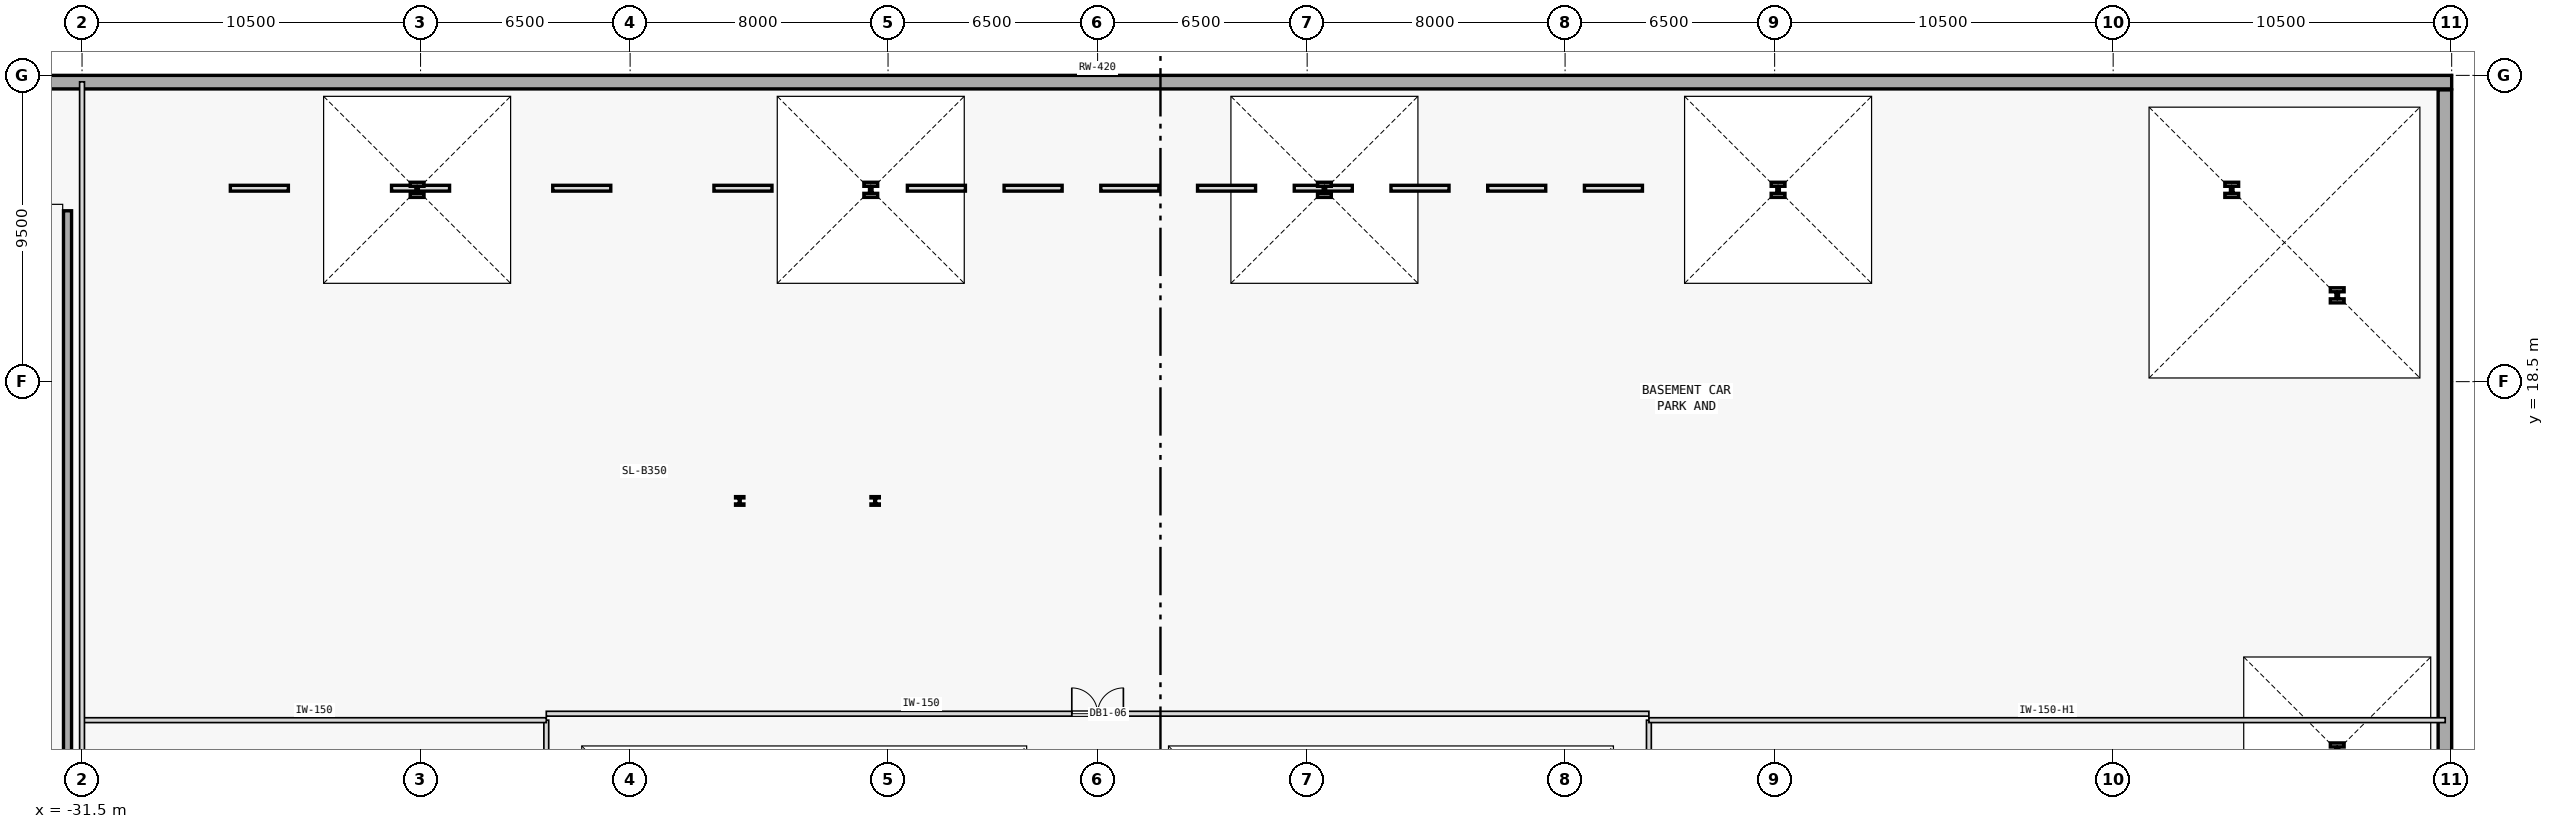
"""IFC4 building model, lengths in metres.
Left out: names, types, materials, properties, quantities, classifications, styles, units other than length and angle.
Written with IfcOpenShell. Run it as: python <this file> out.ifc"""

import sys

from ifc_helpers import new_model, si_unit, direction, frame, frame_2d, origin, origin_2d, place, context, subcontext, project, spatial, rectangle, i_section, extrude, element, fill, save


model = new_model("IFC4")
c1 = context("Model", 3, precision=1e-05, world=origin(), true_north=direction((0.0, 1.0)))
c2 = subcontext(c1, "Body", "Model", "MODEL_VIEW")
j1 = project(units=[si_unit("LENGTHUNIT", "METRE"), si_unit("PLANEANGLEUNIT", "RADIAN")], contexts=[c1])
p1 = place(None, origin())
s1 = spatial("IfcSite", under=j1, at=p1, CompositionType="ELEMENT")
p2 = place(p1, origin())
s2 = spatial("IfcBuilding", under=s1, at=p2, CompositionType="ELEMENT")
p3 = place(p2, frame((0.0, 0.0, -5.0)))
s3 = spatial("IfcBuildingStorey", under=s2, at=p3, CompositionType="ELEMENT", Elevation=-5.0)
p4 = place(p3, frame((-42.0, 27.79, 0.0), z_axis=(0.0, 0.0, 1.0), x_axis=(1.0, 0.0, 0.0)))
e1 = element("IfcWall", 1, at=p4, inside=s3, PredefinedType="SHEAR", context=c2, shape_type="SweptSolid", body=[
    extrude(rectangle(XDim=84.0, YDim=0.42, at=frame_2d((42.0, 0.0))), origin(), (0.0, 0.0, 1.0), 4.7),
])
p5 = place(p3, frame((41.79, -27.55, 0.0), z_axis=(0.0, 0.0, 1.0), x_axis=(0.0, 1.0, 0.0)))
e2 = element("IfcWall", 2, at=p5, inside=s3, PredefinedType="SHEAR", context=c2, shape_type="SweptSolid", body=[
    extrude(rectangle(XDim=55.1, YDim=0.42, at=frame_2d((27.55, 0.0))), origin(), (0.0, 0.0, 1.0), 4.7),
])
p6 = place(p3, frame((-31.95, -16.0, 0.0), z_axis=(0.0, 0.0, 1.0), x_axis=(0.0, 1.0, 0.0)))
e3 = element("IfcWall", 3, at=p6, inside=s3, PredefinedType="SHEAR", context=c2, shape_type="SweptSolid", body=[
    extrude(rectangle(XDim=39.8, YDim=0.25, at=frame_2d((19.9, 0.0))), origin(), (0.0, 0.0, 1.0), 4.7),
])
for number, where, z_axis, x_axis in (
    (4, (38.45, 7.059, 0.0), (0.0, 0.0, 1.0), (1.0, 0.0, 0.0)),
    (5, (38.45, 21.178, 0.0), (0.0, 0.0, 1.0), (1.0, 0.0, 0.0)),
    (6, (35.178, 24.45, 0.0), (0.0, 0.0, 1.0), (1.0, 0.0, 0.0)),
    (7, (21.107, 24.45, 0.0), (0.0, 0.0, 1.0), (1.0, 0.0, 0.0)),
    (8, (7.036, 24.45, 0.0), (0.0, 0.0, 1.0), (1.0, 0.0, 0.0)),
    (9, (-7.036, 24.45, 0.0), (0.0, 0.0, 1.0), (1.0, 0.0, 0.0)),
    (10, (-21.107, 24.45, 0.0), (0.0, 0.0, 1.0), (1.0, 0.0, 0.0)),
):
    element("IfcColumn", number, at=place(p3, frame(where, z_axis=z_axis, x_axis=x_axis)), inside=s3, PredefinedType="USERDEFINED", context=c2, shape_type="SweptSolid", body=[
        extrude(i_section(OverallWidth=0.428, OverallDepth=0.469, WebThickness=0.078, FlangeThickness=0.125, FilletRadius=0.015, at=origin_2d()), origin(), (0.0, 0.0, 1.0), 5.0),
    ])
for number, where, z_axis, x_axis in (
    (11, (-11.1, 14.8, 0.0), (0.0, 0.0, 1.0), (1.0, 0.0, 0.0)),
    (12, (-6.9, 14.8, 0.0), (0.0, 0.0, 1.0), (1.0, 0.0, 0.0)),
):
    element("IfcColumn", number, at=place(p3, frame(where, z_axis=z_axis, x_axis=x_axis)), inside=s3, PredefinedType="COLUMN", context=c2, shape_type="SweptSolid", body=[
        extrude(i_section(OverallWidth=0.259, OverallDepth=0.267, WebThickness=0.013, FlangeThickness=0.021, FilletRadius=0.013, at=origin_2d()), origin(), (0.0, 0.0, 1.0), 5.0),
    ])
p7 = place(p3, frame((-17.1, 8.2, 0.0), z_axis=(0.0, 0.0, 1.0), x_axis=(1.0, 0.0, 0.0)))
e13 = element("IfcWall", 13, at=p7, inside=s3, PredefinedType="PARTITIONING", context=c2, shape_type="SweptSolid", body=[
    extrude(rectangle(XDim=34.2, YDim=0.15, at=frame_2d((17.1, 0.0))), origin(), (0.0, 0.0, 1.0), 4.7),
])
p8 = place(p7, frame((16.3, 0.0, 0.0)))
e14 = element("IfcOpeningElement", 14, at=p8, cuts=e13, PredefinedType="OPENING", context=c2, shape_type="SweptSolid", body=[
    extrude(rectangle(XDim=1.6, YDim=2.15, at=frame_2d((0.8, 1.075))), frame((0.0, 0.085, 0.0), z_axis=(0.0, -1.0, 0.0), x_axis=(1.0, 0.0, 0.0)), (0.0, 0.0, 1.0), 0.17),
])
p9 = place(p3, frame((17.1, 0.0, 0.0), z_axis=(0.0, 0.0, 1.0), x_axis=(0.0, 1.0, 0.0)))
e15 = element("IfcWall", 15, at=p9, inside=s3, PredefinedType="PARTITIONING", context=c2, shape_type="SweptSolid", body=[
    extrude(rectangle(XDim=8.0, YDim=0.15, at=frame_2d((4.0, 0.0))), origin(), (0.0, 0.0, 1.0), 4.7),
])
p10 = place(p9, frame((2.225, 0.0, 0.0)))
e16 = element("IfcOpeningElement", 16, at=p10, cuts=e15, PredefinedType="OPENING", context=c2, shape_type="SweptSolid", body=[
    extrude(rectangle(XDim=1.15, YDim=2.15, at=frame_2d((0.575, 1.075))), frame((0.0, 0.085, 0.0), z_axis=(0.0, -1.0, 0.0), x_axis=(1.0, 0.0, 0.0)), (0.0, 0.0, 1.0), 0.17),
])
p11 = place(p3, frame((-17.1, 0.0, 0.0), z_axis=(0.0, 0.0, 1.0), x_axis=(0.0, 1.0, 0.0)))
e17 = element("IfcWall", 17, at=p11, inside=s3, PredefinedType="PARTITIONING", context=c2, shape_type="SweptSolid", body=[
    extrude(rectangle(XDim=8.0, YDim=0.15, at=frame_2d((4.0, 0.0))), origin(), (0.0, 0.0, 1.0), 4.7),
])
p12 = place(p11, frame((2.225, 0.0, 0.0)))
e18 = element("IfcOpeningElement", 18, at=p12, cuts=e17, PredefinedType="OPENING", context=c2, shape_type="SweptSolid", body=[
    extrude(rectangle(XDim=1.15, YDim=2.15, at=frame_2d((0.575, 1.075))), frame((0.0, 0.085, 0.0), z_axis=(0.0, -1.0, 0.0), x_axis=(1.0, 0.0, 0.0)), (0.0, 0.0, 1.0), 0.17),
])
p13 = place(p3, frame((17.1, 8.0, 0.0), z_axis=(0.0, 0.0, 1.0), x_axis=(1.0, 0.0, 0.0)))
e19 = element("IfcWall", 19, at=p13, inside=s3, PredefinedType="PARTITIONING", context=c2, shape_type="SweptSolid", body=[
    extrude(rectangle(XDim=24.7, YDim=0.15, at=frame_2d((12.35, 0.0))), origin(), (0.0, 0.0, 1.0), 4.25),
])
p14 = place(p3, frame((-31.5, 8.0, 0.0), z_axis=(0.0, 0.0, 1.0), x_axis=(1.0, 0.0, 0.0)))
e20 = element("IfcWall", 20, at=p14, inside=s3, PredefinedType="PARTITIONING", context=c2, shape_type="SweptSolid", body=[
    extrude(rectangle(XDim=14.4, YDim=0.15, at=frame_2d((7.2, 0.0))), origin(), (0.0, 0.0, 1.0), 4.7),
])
p15 = place(p3, frame((-31.5, -27.8, 0.0), z_axis=(0.0, 0.0, 1.0), x_axis=(0.0, 1.0, 0.0)))
e21 = element("IfcWall", 21, at=p15, inside=s3, PredefinedType="PARTITIONING", context=c2, shape_type="SweptSolid", body=[
    extrude(rectangle(XDim=55.6, YDim=0.15, at=frame_2d((27.8, 0.0))), origin(), (0.0, 0.0, 1.0), 4.7),
])
p16 = place(p8, origin())
e22 = element("IfcDoor", 22, at=p16, inside=s3, OperationType="DOUBLE_DOOR_SINGLE_SWING", PredefinedType="DOOR", context=c2, shape_type="SweptSolid", body=[
    extrude(rectangle(XDim=1.6, YDim=2.15, at=frame_2d((0.8, 1.075))), frame((0.0, 0.025, 0.0), z_axis=(0.0, -1.0, 0.0), x_axis=(1.0, 0.0, 0.0)), (0.0, 0.0, 1.0), 0.05),
])
fill(e14, e22)
save(model, sys.argv[1])
